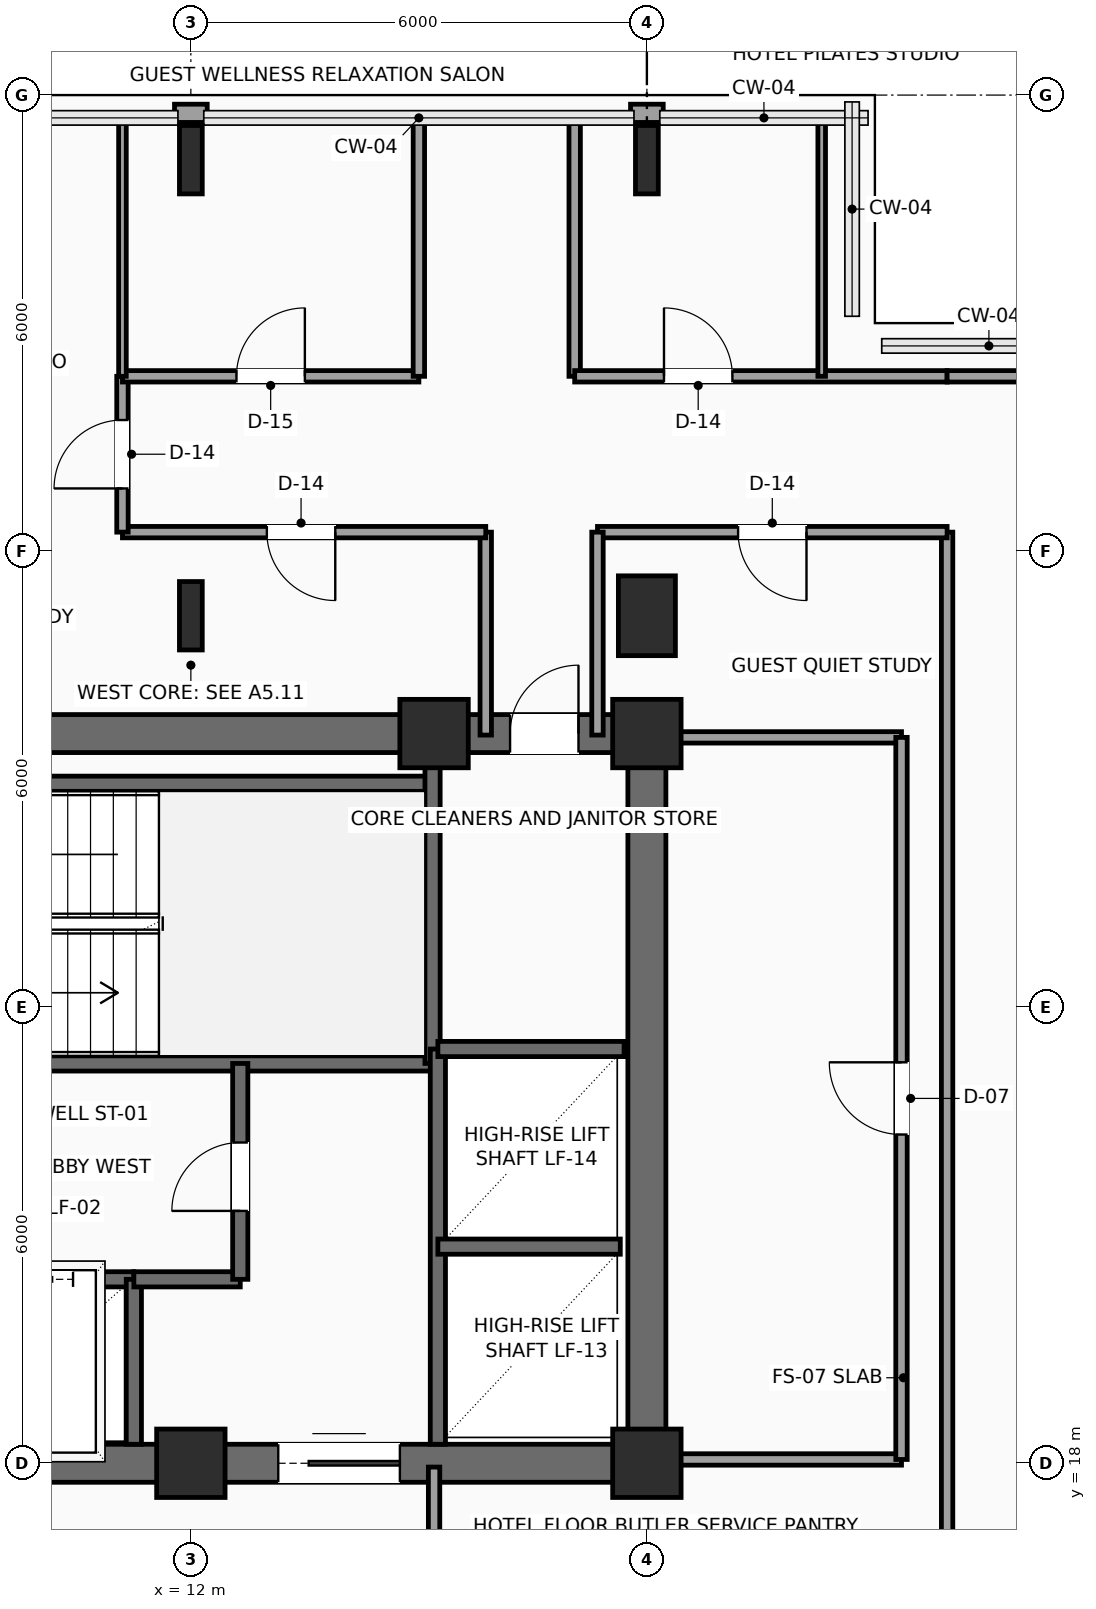
"""IFC4 building model, lengths in metres.
Left out: names, types, materials, properties, quantities, classifications, styles, units other than length and angle.
Written with IfcOpenShell. Run it as: python <this file> out.ifc"""

import sys

from ifc_helpers import new_model, si_unit, direction, frame, frame_2d, origin, origin_2d, place, context, subcontext, project, spatial, rectangle, i_section, extrude, element, fill, save


model = new_model("IFC4")
c1 = context("Model", 3, precision=1e-05, world=origin(), true_north=direction((0.0, 1.0)))
c2 = subcontext(c1, "Body", "Model", "MODEL_VIEW")
j1 = project(units=[si_unit("LENGTHUNIT", "METRE"), si_unit("PLANEANGLEUNIT", "RADIAN")], contexts=[c1])
p1 = place(None, origin())
s1 = spatial("IfcSite", under=j1, at=p1, CompositionType="ELEMENT")
p2 = place(p1, origin())
s2 = spatial("IfcBuilding", under=s1, at=p2, CompositionType="ELEMENT")
p3 = place(p2, frame((0.0, 0.0, 195.45)))
s3 = spatial("IfcBuildingStorey", under=s2, at=p3, CompositionType="ELEMENT", Elevation=195.45)
for number, where, z_axis, x_axis in (
    (1, (12.0, 18.0, 0.0), (0.0, 0.0, 1.0), (1.0, 0.0, 0.0)),
    (2, (18.0, 18.0, 0.0), (0.0, 0.0, 1.0), (1.0, 0.0, 0.0)),
    (3, (15.2, 27.6, 0.0), (0.0, 0.0, 1.0), (1.0, 0.0, 0.0)),
    (4, (18.0, 27.6, 0.0), (0.0, 0.0, 1.0), (1.0, 0.0, 0.0)),
):
    element("IfcColumn", number, at=place(p3, frame(where, z_axis=z_axis, x_axis=x_axis)), inside=s3, PredefinedType="COLUMN", context=c2, shape_type="SweptSolid", body=[
        extrude(rectangle(XDim=0.9, YDim=0.9, at=origin_2d()), origin(), (0.0, 0.0, 1.0), 3.75),
    ])
for number, where, z_axis, x_axis in (
    (5, (12.0, 29.15, 0.0), (0.0, 0.0, 1.0), (1.0, 0.0, 0.0)),
    (6, (12.0, 35.15, 0.0), (0.0, 0.0, 1.0), (1.0, 0.0, 0.0)),
):
    element("IfcColumn", number, at=place(p3, frame(where, z_axis=z_axis, x_axis=x_axis)), inside=s3, PredefinedType="COLUMN", context=c2, shape_type="SweptSolid", body=[
        extrude(i_section(OverallWidth=0.3, OverallDepth=0.9, WebThickness=0.019, FlangeThickness=0.035, FilletRadius=0.03, at=origin_2d()), origin(), (0.0, 0.0, 1.0), 3.75),
    ])
p4 = place(p3, frame((18.0, 29.15, 0.0), z_axis=(0.0, 0.0, 1.0), x_axis=(1.0, 0.0, 0.0)))
e7 = element("IfcColumn", 7, at=p4, inside=s3, PredefinedType="COLUMN", context=c2, shape_type="SweptSolid", body=[
    extrude(rectangle(XDim=0.75, YDim=1.05, at=origin_2d()), origin(), (0.0, 0.0, 1.0), 3.75),
])
p5 = place(p3, frame((18.0, 35.15, 0.0), z_axis=(0.0, 0.0, 1.0), x_axis=(1.0, 0.0, 0.0)))
e8 = element("IfcColumn", 8, at=p5, inside=s3, PredefinedType="COLUMN", context=c2, shape_type="SweptSolid", body=[
    extrude(i_section(OverallWidth=0.3, OverallDepth=0.9, WebThickness=0.019, FlangeThickness=0.035, FilletRadius=0.03, at=origin_2d()), origin(), (0.0, 0.0, 1.0), 3.75),
])
for number, where, z_axis, x_axis in (
    (9, (11.785, 35.76, 0.0), (0.0, 0.0, 1.0), (1.0, 0.0, 0.0)),
    (10, (17.785, 35.76, 0.0), (0.0, 0.0, 1.0), (1.0, 0.0, 0.0)),
):
    element("IfcWall", number, at=place(p3, frame(where, z_axis=z_axis, x_axis=x_axis)), inside=s3, PredefinedType="SOLIDWALL", context=c2, shape_type="SweptSolid", body=[
        extrude(rectangle(XDim=0.43, YDim=0.24, at=frame_2d((0.215, 0.0))), origin(), (0.0, 0.0, 1.0), 3.475),
    ])
p6 = place(p3, frame((6.0, 18.0, 0.0), z_axis=(0.0, 0.0, 1.0), x_axis=(1.0, 0.0, 0.0)))
e11 = element("IfcWall", 11, at=p6, inside=s3, PredefinedType="SHEAR", context=c2, shape_type="SweptSolid", body=[
    extrude(rectangle(XDim=12.0, YDim=0.5, at=frame_2d((6.0, 0.0))), origin(), (0.0, 0.0, 1.0), 3.475),
])
p7 = place(p6, frame((7.15, 0.0, 0.0)))
e12 = element("IfcOpeningElement", 12, at=p7, cuts=e11, PredefinedType="OPENING", context=c2, shape_type="SweptSolid", body=[
    extrude(rectangle(XDim=1.6, YDim=2.3, at=frame_2d((0.8, 1.15))), frame((0.0, 0.26, 0.0), z_axis=(0.0, -1.0, 0.0), x_axis=(1.0, 0.0, 0.0)), (0.0, 0.0, 1.0), 0.52),
])
p8 = place(p3, frame((6.0, 27.6, 0.0), z_axis=(0.0, 0.0, 1.0), x_axis=(1.0, 0.0, 0.0)))
e13 = element("IfcWall", 13, at=p8, inside=s3, PredefinedType="SHEAR", context=c2, shape_type="SweptSolid", body=[
    extrude(rectangle(XDim=12.0, YDim=0.5, at=frame_2d((6.0, 0.0))), origin(), (0.0, 0.0, 1.0), 3.475),
])
p9 = place(p8, frame((10.2, 0.0, 0.0)))
e14 = element("IfcOpeningElement", 14, at=p9, cuts=e13, PredefinedType="OPENING", context=c2, shape_type="SweptSolid", body=[
    extrude(rectangle(XDim=0.9, YDim=2.15, at=frame_2d((0.45, 1.075))), frame((0.0, 0.26, 0.0), z_axis=(0.0, -1.0, 0.0), x_axis=(1.0, 0.0, 0.0)), (0.0, 0.0, 1.0), 0.52),
])
p10 = place(p3, frame((18.0, 18.0, 0.0), z_axis=(0.0, 0.0, 1.0), x_axis=(0.0, 1.0, 0.0)))
e15 = element("IfcWall", 15, at=p10, inside=s3, PredefinedType="SHEAR", context=c2, shape_type="SweptSolid", body=[
    extrude(rectangle(XDim=9.6, YDim=0.5, at=frame_2d((4.8, 0.0))), origin(), (0.0, 0.0, 1.0), 3.475),
])
p11 = place(p3, frame((6.3, 23.26, 0.0), z_axis=(0.0, 0.0, 1.0), x_axis=(1.0, 0.0, 0.0)))
e16 = element("IfcWall", 16, at=p11, inside=s3, PredefinedType="SHEAR", context=c2, shape_type="SweptSolid", body=[
    extrude(rectangle(XDim=8.88, YDim=0.2, at=frame_2d((4.44, 0.0))), origin(), (0.0, 0.0, 1.0), 3.475),
])
p12 = place(p11, frame((0.35, 0.0, 0.0)))
e17 = element("IfcOpeningElement", 17, at=p12, cuts=e16, PredefinedType="OPENING", context=c2, shape_type="SweptSolid", body=[
    extrude(rectangle(XDim=1.1, YDim=2.2, at=frame_2d((0.55, 1.1))), frame((0.0, 0.11, 0.0), z_axis=(0.0, -1.0, 0.0), x_axis=(1.0, 0.0, 0.0)), (0.0, 0.0, 1.0), 0.22),
])
p13 = place(p3, frame((6.3, 26.94, 0.0), z_axis=(0.0, 0.0, 1.0), x_axis=(1.0, 0.0, 0.0)))
e18 = element("IfcWall", 18, at=p13, inside=s3, PredefinedType="SHEAR", context=c2, shape_type="SweptSolid", body=[
    extrude(rectangle(XDim=8.88, YDim=0.2, at=frame_2d((4.44, 0.0))), origin(), (0.0, 0.0, 1.0), 3.475),
])
p14 = place(p3, frame((15.18, 23.26, 0.0), z_axis=(0.0, 0.0, 1.0), x_axis=(0.0, 1.0, 0.0)))
e19 = element("IfcWall", 19, at=p14, inside=s3, PredefinedType="SHEAR", context=c2, shape_type="SweptSolid", body=[
    extrude(rectangle(XDim=4.04, YDim=0.2, at=frame_2d((2.02, 0.0))), origin(), (0.0, 0.0, 1.0), 3.475),
])
p15 = place(p3, frame((6.3, 20.42, 0.0), z_axis=(0.0, 0.0, 1.0), x_axis=(1.0, 0.0, 0.0)))
e20 = element("IfcWall", 20, at=p15, inside=s3, PredefinedType="SHEAR", context=c2, shape_type="SweptSolid", body=[
    extrude(rectangle(XDim=4.95, YDim=0.2, at=frame_2d((2.475, 0.0))), origin(), (0.0, 0.0, 1.0), 3.475),
])
p16 = place(p15, frame((0.65, 0.0, 0.0)))
e21 = element("IfcOpeningElement", 21, at=p16, cuts=e20, PredefinedType="OPENING", context=c2, shape_type="SweptSolid", body=[
    extrude(rectangle(XDim=1.1, YDim=2.2, at=frame_2d((0.55, 1.1))), frame((0.0, 0.11, 0.0), z_axis=(0.0, -1.0, 0.0), x_axis=(1.0, 0.0, 0.0)), (0.0, 0.0, 1.0), 0.22),
])
p17 = place(p15, frame((3.05, 0.0, 0.0)))
e22 = element("IfcOpeningElement", 22, at=p17, cuts=e20, PredefinedType="OPENING", context=c2, shape_type="SweptSolid", body=[
    extrude(rectangle(XDim=1.1, YDim=2.2, at=frame_2d((0.55, 1.1))), frame((0.0, 0.11, 0.0), z_axis=(0.0, -1.0, 0.0), x_axis=(1.0, 0.0, 0.0)), (0.0, 0.0, 1.0), 0.22),
])
p18 = place(p3, frame((11.25, 18.25, 0.0), z_axis=(0.0, 0.0, 1.0), x_axis=(0.0, 1.0, 0.0)))
e23 = element("IfcWall", 23, at=p18, inside=s3, PredefinedType="SHEAR", context=c2, shape_type="SweptSolid", body=[
    extrude(rectangle(XDim=2.17, YDim=0.2, at=frame_2d((1.085, 0.0))), origin(), (0.0, 0.0, 1.0), 3.475),
])
p19 = place(p3, frame((11.25, 20.42, 0.0), z_axis=(0.0, 0.0, 1.0), x_axis=(1.0, 0.0, 0.0)))
e24 = element("IfcWall", 24, at=p19, inside=s3, PredefinedType="SHEAR", context=c2, shape_type="SweptSolid", body=[
    extrude(rectangle(XDim=1.4, YDim=0.2, at=frame_2d((0.7, 0.0))), origin(), (0.0, 0.0, 1.0), 3.475),
])
p20 = place(p3, frame((12.65, 20.42, 0.0), z_axis=(0.0, 0.0, 1.0), x_axis=(0.0, 1.0, 0.0)))
e25 = element("IfcWall", 25, at=p20, inside=s3, PredefinedType="SHEAR", context=c2, shape_type="SweptSolid", body=[
    extrude(rectangle(XDim=2.84, YDim=0.2, at=frame_2d((1.42, 0.0))), origin(), (0.0, 0.0, 1.0), 3.475),
])
p21 = place(p20, frame((0.9, 0.0, 0.0)))
e26 = element("IfcOpeningElement", 26, at=p21, cuts=e25, PredefinedType="OPENING", context=c2, shape_type="SweptSolid", body=[
    extrude(rectangle(XDim=0.9, YDim=2.15, at=frame_2d((0.45, 1.075))), frame((0.0, 0.11, 0.0), z_axis=(0.0, -1.0, 0.0), x_axis=(1.0, 0.0, 0.0)), (0.0, 0.0, 1.0), 0.22),
])
p22 = place(p3, frame((15.25, 18.25, 0.0), z_axis=(0.0, 0.0, 1.0), x_axis=(0.0, 1.0, 0.0)))
e27 = element("IfcWall", 27, at=p22, inside=s3, PredefinedType="SHEAR", context=c2, shape_type="SweptSolid", body=[
    extrude(rectangle(XDim=5.2, YDim=0.2, at=frame_2d((2.6, 0.0))), origin(), (0.0, 0.0, 1.0), 3.475),
])
p23 = place(p3, frame((15.25, 20.85, 0.0), z_axis=(0.0, 0.0, 1.0), x_axis=(1.0, 0.0, 0.0)))
e28 = element("IfcWall", 28, at=p23, inside=s3, PredefinedType="SHEAR", context=c2, shape_type="SweptSolid", body=[
    extrude(rectangle(XDim=2.4, YDim=0.2, at=frame_2d((1.2, 0.0))), origin(), (0.0, 0.0, 1.0), 3.475),
])
p24 = place(p3, frame((15.25, 23.45, 0.0), z_axis=(0.0, 0.0, 1.0), x_axis=(1.0, 0.0, 0.0)))
e29 = element("IfcWall", 29, at=p24, inside=s3, PredefinedType="SHEAR", context=c2, shape_type="SweptSolid", body=[
    extrude(rectangle(XDim=2.45, YDim=0.2, at=frame_2d((1.225, 0.0))), origin(), (0.0, 0.0, 1.0), 3.475),
])
p25 = place(p3, frame((15.2, 17.95, 0.0), z_axis=(0.0, 0.0, 1.0), x_axis=(0.0, -1.0, 0.0)))
e30 = element("IfcWall", 30, at=p25, inside=s3, PredefinedType="PARTITIONING", context=c2, shape_type="SweptSolid", body=[
    extrude(rectangle(XDim=1.7, YDim=0.15, at=frame_2d((0.85, 0.0))), origin(), (0.0, 0.0, 1.0), 3.475),
])
p26 = place(p3, frame((21.95, 11.25, 0.0), z_axis=(0.0, 0.0, 1.0), x_axis=(0.0, 1.0, 0.0)))
e31 = element("IfcWall", 31, at=p26, inside=s3, PredefinedType="PARTITIONING", context=c2, shape_type="SweptSolid", body=[
    extrude(rectangle(XDim=19.0, YDim=0.15, at=frame_2d((9.5, 0.0))), origin(), (0.0, 0.0, 1.0), 3.475),
])
p27 = place(p3, frame((21.95, 30.25, 0.0), z_axis=(0.0, 0.0, 1.0), x_axis=(-1.0, 0.0, 0.0)))
e32 = element("IfcWall", 32, at=p27, inside=s3, PredefinedType="PARTITIONING", context=c2, shape_type="SweptSolid", body=[
    extrude(rectangle(XDim=4.6, YDim=0.15, at=frame_2d((2.3, 0.0))), origin(), (0.0, 0.0, 1.0), 3.475),
])
p28 = place(p27, frame((1.85, 0.0, 0.0)))
e33 = element("IfcOpeningElement", 33, at=p28, cuts=e32, PredefinedType="OPENING", context=c2, shape_type="SweptSolid", body=[
    extrude(rectangle(XDim=0.9, YDim=2.1, at=frame_2d((0.45, 1.05))), frame((0.0, 0.085, 0.0), z_axis=(0.0, -1.0, 0.0), x_axis=(1.0, 0.0, 0.0)), (0.0, 0.0, 1.0), 0.17),
])
for number, where, z_axis, x_axis in (
    (34, (17.35, 30.25, 0.0), (0.0, 0.0, 1.0), (0.0, -1.0, 0.0)),
    (35, (15.88, 27.58, 0.0), (0.0, 0.0, 1.0), (0.0, 1.0, 0.0)),
):
    element("IfcWall", number, at=place(p3, frame(where, z_axis=z_axis, x_axis=x_axis)), inside=s3, PredefinedType="PARTITIONING", context=c2, shape_type="SweptSolid", body=[
        extrude(rectangle(XDim=2.67, YDim=0.15, at=frame_2d((1.335, 0.0))), origin(), (0.0, 0.0, 1.0), 3.475),
    ])
p29 = place(p3, frame((15.88, 30.25, 0.0), z_axis=(0.0, 0.0, 1.0), x_axis=(-1.0, 0.0, 0.0)))
e36 = element("IfcWall", 36, at=p29, inside=s3, PredefinedType="PARTITIONING", context=c2, shape_type="SweptSolid", body=[
    extrude(rectangle(XDim=4.78, YDim=0.15, at=frame_2d((2.39, 0.0))), origin(), (0.0, 0.0, 1.0), 3.475),
])
p30 = place(p29, frame((1.98, 0.0, 0.0)))
e37 = element("IfcOpeningElement", 37, at=p30, cuts=e36, PredefinedType="OPENING", context=c2, shape_type="SweptSolid", body=[
    extrude(rectangle(XDim=0.9, YDim=2.1, at=frame_2d((0.45, 1.05))), frame((0.0, 0.085, 0.0), z_axis=(0.0, -1.0, 0.0), x_axis=(1.0, 0.0, 0.0)), (0.0, 0.0, 1.0), 0.17),
])
p31 = place(p3, frame((11.1, 30.25, 0.0), z_axis=(0.0, 0.0, 1.0), x_axis=(0.0, 1.0, 0.0)))
e38 = element("IfcWall", 38, at=p31, inside=s3, PredefinedType="PARTITIONING", context=c2, shape_type="SweptSolid", body=[
    extrude(rectangle(XDim=2.05, YDim=0.15, at=frame_2d((1.025, 0.0))), origin(), (0.0, 0.0, 1.0), 3.475),
])
p32 = place(p31, frame((0.575, 0.0, 0.0)))
e39 = element("IfcOpeningElement", 39, at=p32, cuts=e38, PredefinedType="OPENING", context=c2, shape_type="SweptSolid", body=[
    extrude(rectangle(XDim=0.9, YDim=2.1, at=frame_2d((0.45, 1.05))), frame((0.0, 0.085, 0.0), z_axis=(0.0, -1.0, 0.0), x_axis=(1.0, 0.0, 0.0)), (0.0, 0.0, 1.0), 0.17),
])
p33 = place(p3, frame((11.1, 32.3, 0.0), z_axis=(0.0, 0.0, 1.0), x_axis=(1.0, 0.0, 0.0)))
e40 = element("IfcWall", 40, at=p33, inside=s3, PredefinedType="PARTITIONING", context=c2, shape_type="SweptSolid", body=[
    extrude(rectangle(XDim=3.9, YDim=0.15, at=frame_2d((1.95, 0.0))), origin(), (0.0, 0.0, 1.0), 3.067),
])
p34 = place(p33, frame((1.5, 0.0, 0.0)))
e41 = element("IfcOpeningElement", 41, at=p34, cuts=e40, PredefinedType="OPENING", context=c2, shape_type="SweptSolid", body=[
    extrude(rectangle(XDim=0.9, YDim=2.1, at=frame_2d((0.45, 1.05))), frame((0.0, 0.085, 0.0), z_axis=(0.0, -1.0, 0.0), x_axis=(1.0, 0.0, 0.0)), (0.0, 0.0, 1.0), 0.17),
])
for number, where, z_axis, x_axis in (
    (42, (15.0, 32.3, 0.0), (0.0, 0.0, 1.0), (0.0, 1.0, 0.0)),
    (43, (17.05, 35.7, 0.0), (0.0, 0.0, 1.0), (0.0, -1.0, 0.0)),
):
    element("IfcWall", number, at=place(p3, frame(where, z_axis=z_axis, x_axis=x_axis)), inside=s3, PredefinedType="PARTITIONING", context=c2, shape_type="SweptSolid", body=[
        extrude(rectangle(XDim=3.4, YDim=0.15, at=frame_2d((1.7, 0.0))), origin(), (0.0, 0.0, 1.0), 3.475),
    ])
p35 = place(p3, frame((17.05, 32.3, 0.0), z_axis=(0.0, 0.0, 1.0), x_axis=(1.0, 0.0, 0.0)))
e44 = element("IfcWall", 44, at=p35, inside=s3, PredefinedType="PARTITIONING", context=c2, shape_type="SweptSolid", body=[
    extrude(rectangle(XDim=4.9, YDim=0.15, at=frame_2d((2.45, 0.0))), origin(), (0.0, 0.0, 1.0), 3.067),
])
p36 = place(p35, frame((1.175, 0.0, 0.0)))
e45 = element("IfcOpeningElement", 45, at=p36, cuts=e44, PredefinedType="OPENING", context=c2, shape_type="SweptSolid", body=[
    extrude(rectangle(XDim=0.9, YDim=2.1, at=frame_2d((0.45, 1.05))), frame((0.0, 0.085, 0.0), z_axis=(0.0, -1.0, 0.0), x_axis=(1.0, 0.0, 0.0)), (0.0, 0.0, 1.0), 0.17),
])
p37 = place(p3, frame((21.95, 32.3, 0.0), z_axis=(0.0, 0.0, 1.0), x_axis=(1.0, 0.0, 0.0)))
e46 = element("IfcWall", 46, at=p37, inside=s3, PredefinedType="PARTITIONING", context=c2, shape_type="SweptSolid", body=[
    extrude(rectangle(XDim=1.75, YDim=0.15, at=frame_2d((0.875, 0.0))), origin(), (0.0, 0.0, 1.0), 3.475),
])
p38 = place(p3, frame((18.1, 18.05, 0.0), z_axis=(0.0, 0.0, 1.0), x_axis=(1.0, 0.0, 0.0)))
e47 = element("IfcWall", 47, at=p38, inside=s3, PredefinedType="PARTITIONING", context=c2, shape_type="SweptSolid", body=[
    extrude(rectangle(XDim=3.25, YDim=0.15, at=frame_2d((1.625, 0.0))), origin(), (0.0, 0.0, 1.0), 3.067),
])
p39 = place(p3, frame((18.1, 27.55, 0.0), z_axis=(0.0, 0.0, 1.0), x_axis=(1.0, 0.0, 0.0)))
e48 = element("IfcWall", 48, at=p39, inside=s3, PredefinedType="PARTITIONING", context=c2, shape_type="SweptSolid", body=[
    extrude(rectangle(XDim=3.25, YDim=0.15, at=frame_2d((1.625, 0.0))), origin(), (0.0, 0.0, 1.0), 3.475),
])
p40 = place(p3, frame((21.35, 18.05, 0.0), z_axis=(0.0, 0.0, 1.0), x_axis=(0.0, 1.0, 0.0)))
e49 = element("IfcWall", 49, at=p40, inside=s3, PredefinedType="PARTITIONING", context=c2, shape_type="SweptSolid", body=[
    extrude(rectangle(XDim=9.5, YDim=0.15, at=frame_2d((4.75, 0.0))), origin(), (0.0, 0.0, 1.0), 3.475),
])
p41 = place(p40, frame((4.275, 0.0, 0.0)))
e50 = element("IfcOpeningElement", 50, at=p41, cuts=e49, PredefinedType="OPENING", context=c2, shape_type="SweptSolid", body=[
    extrude(rectangle(XDim=0.95, YDim=2.15, at=frame_2d((0.475, 1.075))), frame((0.0, 0.085, 0.0), z_axis=(0.0, -1.0, 0.0), x_axis=(1.0, 0.0, 0.0)), (0.0, 0.0, 1.0), 0.17),
])
p42 = place(p3, frame((0.35, 35.65, 0.0), z_axis=(0.0, 0.0, 1.0), x_axis=(0.999989162382, 0.004655654485, 0.0)))
e51 = element("IfcWall", 51, at=p42, inside=s3, PredefinedType="PARTITIONING", context=c2, shape_type="SweptSolid", body=[
    extrude(rectangle(XDim=10.75, YDim=0.1, at=frame_2d((5.375, 0.0))), origin(), (0.0, 0.0, 1.0), 3.475),
])
for number, where, z_axis, x_axis in (
    (52, (11.1, 32.3, 0.0), (0.0, 0.0, 1.0), (0.0, 1.0, 0.0)),
    (53, (20.3, 32.3, 0.0), (0.0, 0.0, 1.0), (0.0, 1.0, 0.0)),
):
    element("IfcWall", number, at=place(p3, frame(where, z_axis=z_axis, x_axis=x_axis)), inside=s3, PredefinedType="PARTITIONING", context=c2, shape_type="SweptSolid", body=[
        extrude(rectangle(XDim=3.4, YDim=0.1, at=frame_2d((1.7, 0.0))), origin(), (0.0, 0.0, 1.0), 3.475),
    ])
p43 = place(p7, origin())
e54 = element("IfcDoor", 54, at=p43, inside=s3, OperationType="DOUBLE_DOOR_SLIDING", PredefinedType="DOOR", context=c2, shape_type="SweptSolid", body=[
    extrude(rectangle(XDim=1.6, YDim=2.3, at=frame_2d((0.8, 1.15))), frame((0.0, 0.025, 0.0), z_axis=(0.0, -1.0, 0.0), x_axis=(1.0, 0.0, 0.0)), (0.0, 0.0, 1.0), 0.05),
])
fill(e12, e54)
p44 = place(p9, origin())
e55 = element("IfcDoor", 55, at=p44, inside=s3, OperationType="SINGLE_SWING_RIGHT", PredefinedType="DOOR", context=c2, shape_type="SweptSolid", body=[
    extrude(rectangle(XDim=0.9, YDim=2.15, at=frame_2d((0.45, 1.075))), frame((0.0, 0.025, 0.0), z_axis=(0.0, -1.0, 0.0), x_axis=(1.0, 0.0, 0.0)), (0.0, 0.0, 1.0), 0.05),
])
fill(e14, e55)
p45 = place(p17, origin())
e56 = element("IfcDoor", 56, at=p45, inside=s3, OperationType="SLIDING_TO_LEFT", PredefinedType="DOOR", context=c2, shape_type="SweptSolid", body=[
    extrude(rectangle(XDim=1.1, YDim=2.2, at=frame_2d((0.55, 1.1))), frame((0.0, 0.025, 0.0), z_axis=(0.0, -1.0, 0.0), x_axis=(1.0, 0.0, 0.0)), (0.0, 0.0, 1.0), 0.05),
])
fill(e22, e56)
p46 = place(p21, origin())
e57 = element("IfcDoor", 57, at=p46, inside=s3, OperationType="SINGLE_SWING_LEFT", PredefinedType="DOOR", context=c2, shape_type="SweptSolid", body=[
    extrude(rectangle(XDim=0.9, YDim=2.15, at=frame_2d((0.45, 1.075))), frame((0.0, 0.025, 0.0), z_axis=(0.0, -1.0, 0.0), x_axis=(1.0, 0.0, 0.0)), (0.0, 0.0, 1.0), 0.05),
])
fill(e26, e57)
p47 = place(p28, origin())
e58 = element("IfcDoor", 58, at=p47, inside=s3, OperationType="SINGLE_SWING_LEFT", PredefinedType="DOOR", context=c2, shape_type="SweptSolid", body=[
    extrude(rectangle(XDim=0.9, YDim=2.1, at=frame_2d((0.45, 1.05))), frame((0.0, 0.025, 0.0), z_axis=(0.0, -1.0, 0.0), x_axis=(1.0, 0.0, 0.0)), (0.0, 0.0, 1.0), 0.05),
])
fill(e33, e58)
p48 = place(p30, origin())
e59 = element("IfcDoor", 59, at=p48, inside=s3, OperationType="SINGLE_SWING_LEFT", PredefinedType="DOOR", context=c2, shape_type="SweptSolid", body=[
    extrude(rectangle(XDim=0.9, YDim=2.1, at=frame_2d((0.45, 1.05))), frame((0.0, 0.025, 0.0), z_axis=(0.0, -1.0, 0.0), x_axis=(1.0, 0.0, 0.0)), (0.0, 0.0, 1.0), 0.05),
])
fill(e37, e59)
p49 = place(p32, origin())
e60 = element("IfcDoor", 60, at=p49, inside=s3, OperationType="SINGLE_SWING_LEFT", PredefinedType="DOOR", context=c2, shape_type="SweptSolid", body=[
    extrude(rectangle(XDim=0.9, YDim=2.1, at=frame_2d((0.45, 1.05))), frame((0.0, 0.025, 0.0), z_axis=(0.0, -1.0, 0.0), x_axis=(1.0, 0.0, 0.0)), (0.0, 0.0, 1.0), 0.05),
])
fill(e39, e60)
p50 = place(p34, origin())
e61 = element("IfcDoor", 61, at=p50, inside=s3, OperationType="SINGLE_SWING_RIGHT", PredefinedType="DOOR", context=c2, shape_type="SweptSolid", body=[
    extrude(rectangle(XDim=0.9, YDim=2.1, at=frame_2d((0.45, 1.05))), frame((0.0, 0.025, 0.0), z_axis=(0.0, -1.0, 0.0), x_axis=(1.0, 0.0, 0.0)), (0.0, 0.0, 1.0), 0.05),
])
fill(e41, e61)
p51 = place(p36, origin())
e62 = element("IfcDoor", 62, at=p51, inside=s3, OperationType="SINGLE_SWING_LEFT", PredefinedType="DOOR", context=c2, shape_type="SweptSolid", body=[
    extrude(rectangle(XDim=0.9, YDim=2.1, at=frame_2d((0.45, 1.05))), frame((0.0, 0.025, 0.0), z_axis=(0.0, -1.0, 0.0), x_axis=(1.0, 0.0, 0.0)), (0.0, 0.0, 1.0), 0.05),
])
fill(e45, e62)
p52 = place(p41, origin())
e63 = element("IfcDoor", 63, at=p52, inside=s3, OperationType="SINGLE_SWING_RIGHT", PredefinedType="DOOR", context=c2, shape_type="SweptSolid", body=[
    extrude(rectangle(XDim=0.95, YDim=2.15, at=frame_2d((0.475, 1.075))), frame((0.0, 0.025, 0.0), z_axis=(0.0, -1.0, 0.0), x_axis=(1.0, 0.0, 0.0)), (0.0, 0.0, 1.0), 0.05),
])
fill(e50, e63)
save(model, sys.argv[1])
